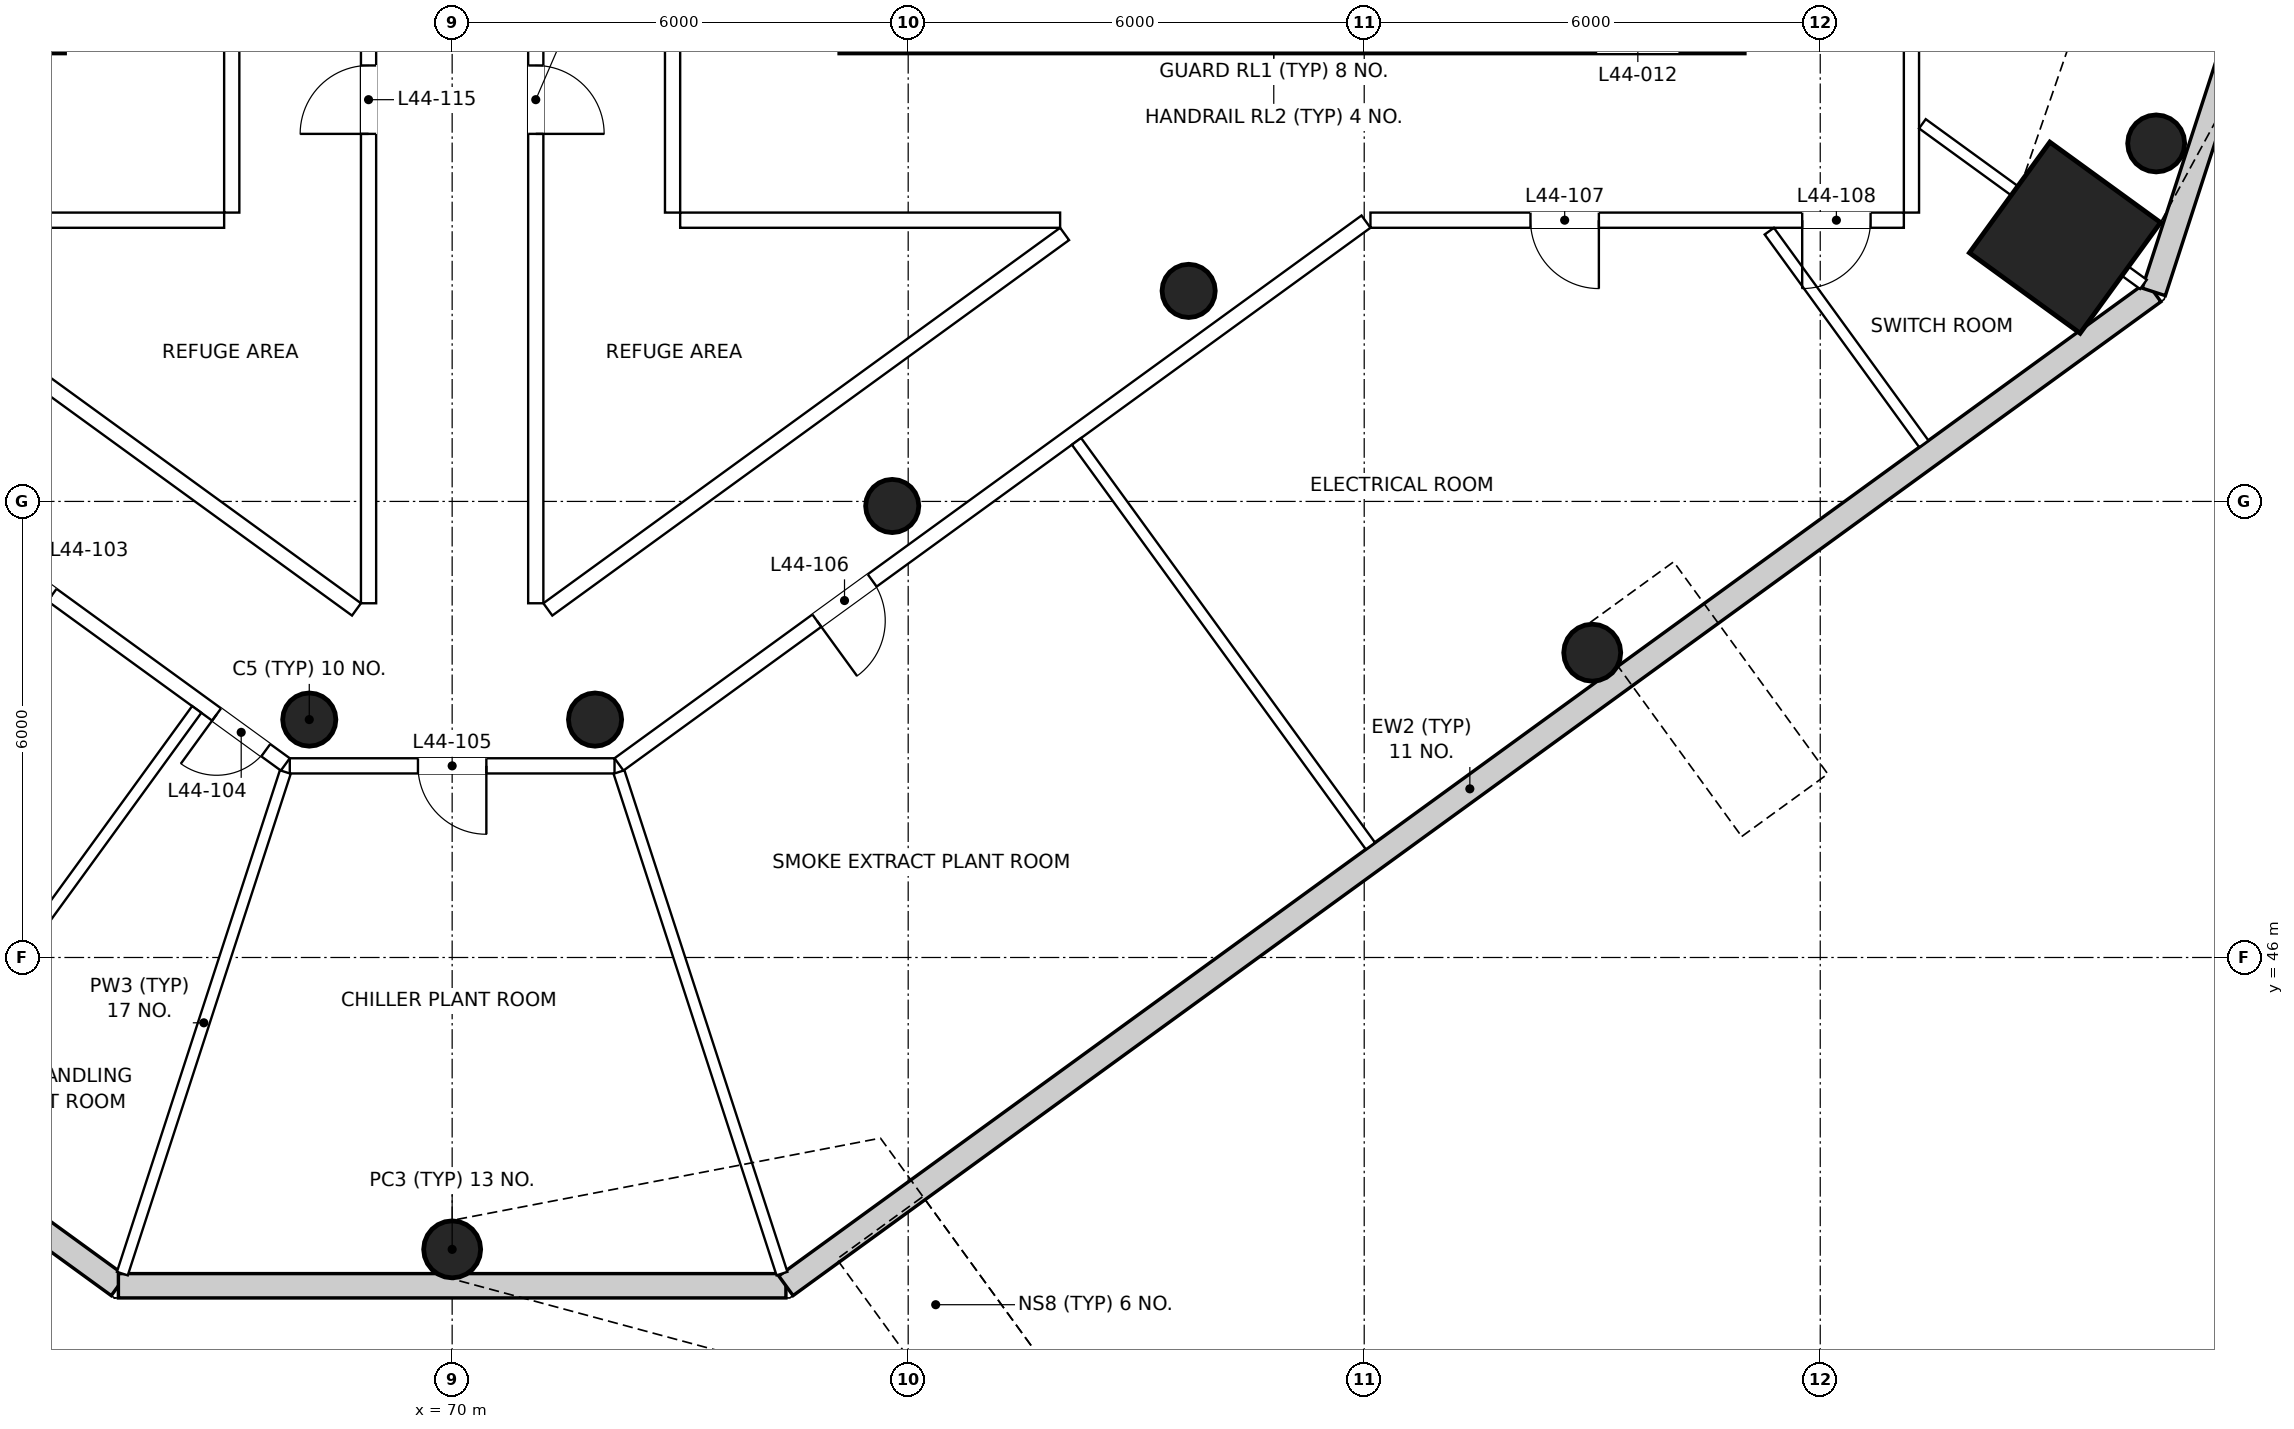
"""IFC4 building model, lengths in metres.
Left out: names, types, materials, properties, quantities, classifications, styles, units other than length and angle.
Written with IfcOpenShell. Run it as: python <this file> out.ifc"""

import sys

from ifc_helpers import new_model, si_unit, direction, frame, frame_2d, origin, origin_2d, place, context, subcontext, project, spatial, rectangle, circle, extrude, element, fill, save


model = new_model("IFC4")
c1 = context("Model", 3, precision=1e-05, world=origin(), true_north=direction((0.0, 1.0)))
c2 = subcontext(c1, "Body", "Model", "MODEL_VIEW")
j1 = project(units=[si_unit("LENGTHUNIT", "METRE"), si_unit("PLANEANGLEUNIT", "RADIAN")], contexts=[c1])
p1 = place(None, origin())
s1 = spatial("IfcSite", under=j1, at=p1, CompositionType="ELEMENT")
p2 = place(p1, origin())
s2 = spatial("IfcBuilding", under=s1, at=p2, CompositionType="ELEMENT")
p3 = place(p2, frame((0.0, 0.0, 191.5)))
s3 = spatial("IfcBuildingStorey", under=s2, at=p3, CompositionType="ELEMENT", Elevation=191.5)
for number, where, z_axis, x_axis in (
    (1, (70.0, 42.16, 0.0), (0.0, 0.0, 1.0), (1.0, 0.0, 0.0)),
    (2, (85.0, 50.01, 0.0), (0.0, 0.0, 1.0), (1.0, 0.0, 0.0)),
):
    element("IfcColumn", number, at=place(p3, frame(where, z_axis=z_axis, x_axis=x_axis)), inside=s3, PredefinedType="COLUMN", context=c2, shape_type="SweptSolid", body=[
        extrude(circle(Radius=0.375, at=origin_2d()), origin(), (0.0, 0.0, 1.0), 5.0),
    ])
p4 = place(p3, frame((91.22, 55.47, 0.0), z_axis=(0.0, 0.0, 1.0), x_axis=(0.809016994375, -0.587785252292, 0.0)))
e3 = element("IfcColumn", 3, at=p4, inside=s3, PredefinedType="COLUMN", context=c2, shape_type="SweptSolid", body=[
    extrude(rectangle(XDim=1.8, YDim=1.8, at=origin_2d()), origin(), (0.0, 0.0, 1.0), 5.0),
])
p5 = place(p3, frame((92.42, 56.71, 0.0), z_axis=(0.0, 0.0, 1.0), x_axis=(1.0, 0.0, 0.0)))
e4 = element("IfcColumn", 4, at=p5, inside=s3, PredefinedType="COLUMN", context=c2, shape_type="SweptSolid", body=[
    extrude(circle(Radius=0.375, at=origin_2d()), origin(), (0.0, 0.0, 1.0), 5.0),
])
for number, where, z_axis, x_axis in (
    (5, (68.12, 49.13, 0.0), (0.0, 0.0, 1.0), (1.0, 0.0, 0.0)),
    (6, (71.88, 49.13, 0.0), (0.0, 0.0, 1.0), (1.0, 0.0, 0.0)),
    (7, (75.79, 51.94, 0.0), (0.0, 0.0, 1.0), (1.0, 0.0, 0.0)),
    (8, (79.69, 54.77, 0.0), (0.0, 0.0, 1.0), (1.0, 0.0, 0.0)),
):
    element("IfcColumn", number, at=place(p3, frame(where, z_axis=z_axis, x_axis=x_axis)), inside=s3, PredefinedType="COLUMN", context=c2, shape_type="SweptSolid", body=[
        extrude(circle(Radius=0.35, at=origin_2d()), origin(), (0.0, 0.0, 1.0), 5.0),
    ])
p6 = place(p3, frame((47.612, 54.757, 0.0), z_axis=(0.0, 0.0, 1.0), x_axis=(0.809015997552, -0.5877866243, 0.0)))
e9 = element("IfcWall", 9, at=p6, inside=s3, PredefinedType="SOLIDWALL", context=c2, shape_type="SweptSolid", body=[
    extrude(rectangle(XDim=22.246, YDim=0.32, at=frame_2d((11.123, 0.0))), origin(), (0.0, 0.0, 1.0), 4.7),
])
p7 = place(p3, frame((65.609, 41.681, 0.0), z_axis=(0.0, 0.0, 1.0), x_axis=(1.0, 0.0, 0.0)))
e10 = element("IfcWall", 10, at=p7, inside=s3, PredefinedType="SOLIDWALL", context=c2, shape_type="SweptSolid", body=[
    extrude(rectangle(XDim=8.783, YDim=0.32, at=frame_2d((4.391, 0.0))), origin(), (0.0, 0.0, 1.0), 4.7),
])
p8 = place(p3, frame((74.391, 41.681, 0.0), z_axis=(0.0, 0.0, 1.0), x_axis=(0.809015997552, 0.5877866243, 0.0)))
e11 = element("IfcWall", 11, at=p8, inside=s3, PredefinedType="SOLIDWALL", context=c2, shape_type="SweptSolid", body=[
    extrude(rectangle(XDim=22.246, YDim=0.32, at=frame_2d((11.123, 0.0))), origin(), (0.0, 0.0, 1.0), 4.7),
])
p9 = place(p3, frame((92.388, 54.757, 0.0), z_axis=(0.0, 0.0, 1.0), x_axis=(0.30901958848, 0.951055673415, 0.0)))
e12 = element("IfcWall", 12, at=p9, inside=s3, PredefinedType="SOLIDWALL", context=c2, shape_type="SweptSolid", body=[
    extrude(rectangle(XDim=8.22, YDim=0.32, at=frame_2d((4.11, 0.0))), origin(), (0.0, 0.0, 1.0), 4.7),
])
p10 = place(p3, frame((53.0, 58.05, 0.0), z_axis=(0.0, 0.0, 1.0), x_axis=(1.0, 0.0, 0.0)))
e13 = element("IfcWall", 13, at=p10, inside=s3, PredefinedType="SHEAR", context=c2, shape_type="SweptSolid", body=[
    extrude(rectangle(XDim=11.9, YDim=0.3, at=frame_2d((5.95, 0.0))), origin(), (0.0, 0.0, 1.0), 5.0),
])
p11 = place(p10, frame((0.85, 0.0, 0.0)))
e14 = element("IfcOpeningElement", 14, at=p11, cuts=e13, PredefinedType="OPENING", context=c2, shape_type="SweptSolid", body=[
    extrude(rectangle(XDim=1.1, YDim=2.1, at=frame_2d((0.55, 1.05))), frame((0.0, 0.16, 0.0), z_axis=(0.0, -1.0, 0.0), x_axis=(1.0, 0.0, 0.0)), (0.0, 0.0, 1.0), 0.32),
])
p12 = place(p3, frame((75.1, 58.05, 0.0), z_axis=(0.0, 0.0, 1.0), x_axis=(1.0, 0.0, 0.0)))
e15 = element("IfcWall", 15, at=p12, inside=s3, PredefinedType="SHEAR", context=c2, shape_type="SweptSolid", body=[
    extrude(rectangle(XDim=11.9, YDim=0.3, at=frame_2d((5.95, 0.0))), origin(), (0.0, 0.0, 1.0), 5.0),
])
p13 = place(p12, frame((9.95, 0.0, 0.0)))
e16 = element("IfcOpeningElement", 16, at=p13, cuts=e15, PredefinedType="OPENING", context=c2, shape_type="SweptSolid", body=[
    extrude(rectangle(XDim=1.1, YDim=2.1, at=frame_2d((0.55, 1.05))), frame((0.0, 0.16, 0.0), z_axis=(0.0, -1.0, 0.0), x_axis=(1.0, 0.0, 0.0)), (0.0, 0.0, 1.0), 0.32),
])
p14 = place(p3, frame((89.2, 64.15, 0.0), z_axis=(0.0, 0.0, 1.0), x_axis=(0.0, -1.0, 0.0)))
e17 = element("IfcWall", 17, at=p14, inside=s3, PredefinedType="PARTITIONING", context=c2, shape_type="SweptSolid", body=[
    extrude(rectangle(XDim=8.35, YDim=0.2, at=frame_2d((4.175, 0.0))), origin(), (0.0, 0.0, 1.0), 4.0),
])
p15 = place(p14, frame((3.876, 0.0, 0.0)))
e18 = element("IfcOpeningElement", 18, at=p15, cuts=e17, PredefinedType="OPENING", context=c2, shape_type="SweptSolid", body=[
    extrude(rectangle(XDim=0.9, YDim=2.1, at=frame_2d((0.45, 1.05))), frame((0.0, 0.11, 0.0), z_axis=(0.0, -1.0, 0.0), x_axis=(1.0, 0.0, 0.0)), (0.0, 0.0, 1.0), 0.22),
])
p16 = place(p3, frame((89.1, 55.7, 0.0), z_axis=(0.0, 0.0, 1.0), x_axis=(-1.0, 0.0, 0.0)))
e19 = element("IfcWall", 19, at=p16, inside=s3, PredefinedType="PARTITIONING", context=c2, shape_type="SweptSolid", body=[
    extrude(rectangle(XDim=7.018, YDim=0.2, at=frame_2d((3.509, 0.0))), origin(), (0.0, 0.0, 1.0), 4.0),
])
p17 = place(p16, frame((4.013, 0.0, 0.0)))
e20 = element("IfcOpeningElement", 20, at=p17, cuts=e19, PredefinedType="OPENING", context=c2, shape_type="SweptSolid", body=[
    extrude(rectangle(XDim=0.9, YDim=2.1, at=frame_2d((0.45, 1.05))), frame((0.0, 0.11, 0.0), z_axis=(0.0, -1.0, 0.0), x_axis=(1.0, 0.0, 0.0)), (0.0, 0.0, 1.0), 0.22),
])
p18 = place(p16, frame((0.438, 0.0, 0.0)))
e21 = element("IfcOpeningElement", 21, at=p18, cuts=e19, PredefinedType="OPENING", context=c2, shape_type="SweptSolid", body=[
    extrude(rectangle(XDim=0.9, YDim=2.1, at=frame_2d((0.45, 1.05))), frame((0.0, 0.11, 0.0), z_axis=(0.0, -1.0, 0.0), x_axis=(1.0, 0.0, 0.0)), (0.0, 0.0, 1.0), 0.22),
])
p19 = place(p3, frame((82.023, 55.681, 0.0), z_axis=(0.0, 0.0, 1.0), x_axis=(-0.809021032416, -0.587779694366, 0.0)))
e22 = element("IfcWall", 22, at=p19, inside=s3, PredefinedType="PARTITIONING", context=c2, shape_type="SweptSolid", body=[
    extrude(rectangle(XDim=12.148, YDim=0.2, at=frame_2d((6.074, 0.0))), origin(), (0.0, 0.0, 1.0), 3.7),
])
p20 = place(p19, frame((8.031, 0.0, 0.0)))
e23 = element("IfcOpeningElement", 23, at=p20, cuts=e22, PredefinedType="OPENING", context=c2, shape_type="SweptSolid", body=[
    extrude(rectangle(XDim=0.9, YDim=2.1, at=frame_2d((0.45, 1.05))), frame((0.0, 0.11, 0.0), z_axis=(0.0, -1.0, 0.0), x_axis=(1.0, 0.0, 0.0)), (0.0, 0.0, 1.0), 0.22),
])
p21 = place(p3, frame((72.136, 48.521, 0.0), z_axis=(0.0, 0.0, 1.0), x_axis=(-1.0, 0.0, 0.0)))
e24 = element("IfcWall", 24, at=p21, inside=s3, PredefinedType="PARTITIONING", context=c2, shape_type="SweptSolid", body=[
    extrude(rectangle(XDim=4.272, YDim=0.2, at=frame_2d((2.136, 0.0))), origin(), (0.0, 0.0, 1.0), 3.7),
])
p22 = place(p21, frame((1.686, 0.0, 0.0)))
e25 = element("IfcOpeningElement", 25, at=p22, cuts=e24, PredefinedType="OPENING", context=c2, shape_type="SweptSolid", body=[
    extrude(rectangle(XDim=0.9, YDim=2.1, at=frame_2d((0.45, 1.05))), frame((0.0, 0.11, 0.0), z_axis=(0.0, -1.0, 0.0), x_axis=(1.0, 0.0, 0.0)), (0.0, 0.0, 1.0), 0.22),
])
p23 = place(p3, frame((67.805, 48.54, 0.0), z_axis=(0.0, 0.0, 1.0), x_axis=(-0.809021032416, 0.587779694366, 0.0)))
e26 = element("IfcWall", 26, at=p23, inside=s3, PredefinedType="PARTITIONING", context=c2, shape_type="SweptSolid", body=[
    extrude(rectangle(XDim=12.148, YDim=0.2, at=frame_2d((6.074, 0.0))), origin(), (0.0, 0.0, 1.0), 3.7),
])
p24 = place(p23, frame((3.793, 0.0, 0.0)))
e27 = element("IfcOpeningElement", 27, at=p24, cuts=e26, PredefinedType="OPENING", context=c2, shape_type="SweptSolid", body=[
    extrude(rectangle(XDim=0.9, YDim=2.1, at=frame_2d((0.45, 1.05))), frame((0.0, 0.11, 0.0), z_axis=(0.0, -1.0, 0.0), x_axis=(1.0, 0.0, 0.0)), (0.0, 0.0, 1.0), 0.22),
])
p25 = place(p23, frame((0.318, 0.0, 0.0)))
e28 = element("IfcOpeningElement", 28, at=p25, cuts=e26, PredefinedType="OPENING", context=c2, shape_type="SweptSolid", body=[
    extrude(rectangle(XDim=0.8, YDim=2.1, at=frame_2d((0.4, 1.05))), frame((0.0, 0.11, 0.0), z_axis=(0.0, -1.0, 0.0), x_axis=(1.0, 0.0, 0.0)), (0.0, 0.0, 1.0), 0.22),
])
p26 = place(p3, frame((71.1, 63.85, 0.0), z_axis=(0.0, 0.0, 1.0), x_axis=(0.0, -1.0, 0.0)))
e29 = element("IfcWall", 29, at=p26, inside=s3, PredefinedType="PARTITIONING", context=c2, shape_type="SweptSolid", body=[
    extrude(rectangle(XDim=13.19, YDim=0.2, at=frame_2d((6.595, 0.0))), origin(), (0.0, 0.0, 1.0), 3.7),
])
p27 = place(p26, frame((6.115, 0.0, 0.0)))
e30 = element("IfcOpeningElement", 30, at=p27, cuts=e29, PredefinedType="OPENING", context=c2, shape_type="SweptSolid", body=[
    extrude(rectangle(XDim=0.9, YDim=2.1, at=frame_2d((0.45, 1.05))), frame((0.0, 0.11, 0.0), z_axis=(0.0, -1.0, 0.0), x_axis=(1.0, 0.0, 0.0)), (0.0, 0.0, 1.0), 0.22),
])
p28 = place(p3, frame((71.259, 50.579, 0.0), z_axis=(0.0, 0.0, 1.0), x_axis=(0.809023664715, 0.587776071248, 0.0)))
e31 = element("IfcWall", 31, at=p28, inside=s3, PredefinedType="PARTITIONING", context=c2, shape_type="SweptSolid", body=[
    extrude(rectangle(XDim=8.404, YDim=0.2, at=frame_2d((4.202, 0.0))), origin(), (0.0, 0.0, 1.0), 3.7),
])
p29 = place(p3, frame((77.999, 55.7, 0.0), z_axis=(0.0, 0.0, 1.0), x_axis=(-1.0, 0.0, 0.0)))
e32 = element("IfcWall", 32, at=p29, inside=s3, PredefinedType="PARTITIONING", context=c2, shape_type="SweptSolid", body=[
    extrude(rectangle(XDim=4.999, YDim=0.2, at=frame_2d((2.5, 0.0))), origin(), (0.0, 0.0, 1.0), 3.7),
])
p30 = place(p3, frame((72.9, 55.8, 0.0), z_axis=(0.0, 0.0, 1.0), x_axis=(0.0, 1.0, 0.0)))
e33 = element("IfcWall", 33, at=p30, inside=s3, PredefinedType="PARTITIONING", context=c2, shape_type="SweptSolid", body=[
    extrude(rectangle(XDim=8.35, YDim=0.2, at=frame_2d((4.175, 0.0))), origin(), (0.0, 0.0, 1.0), 3.7),
])
p31 = place(p3, frame((68.9, 50.66, 0.0), z_axis=(0.0, 0.0, 1.0), x_axis=(0.0, 1.0, 0.0)))
e34 = element("IfcWall", 34, at=p31, inside=s3, PredefinedType="PARTITIONING", context=c2, shape_type="SweptSolid", body=[
    extrude(rectangle(XDim=13.19, YDim=0.2, at=frame_2d((6.595, 0.0))), origin(), (0.0, 0.0, 1.0), 3.7),
])
p32 = place(p31, frame((6.175, 0.0, 0.0)))
e35 = element("IfcOpeningElement", 35, at=p32, cuts=e34, PredefinedType="OPENING", context=c2, shape_type="SweptSolid", body=[
    extrude(rectangle(XDim=0.9, YDim=2.1, at=frame_2d((0.45, 1.05))), frame((0.0, 0.11, 0.0), z_axis=(0.0, -1.0, 0.0), x_axis=(1.0, 0.0, 0.0)), (0.0, 0.0, 1.0), 0.22),
])
p33 = place(p3, frame((67.1, 64.15, 0.0), z_axis=(0.0, 0.0, 1.0), x_axis=(0.0, -1.0, 0.0)))
e36 = element("IfcWall", 36, at=p33, inside=s3, PredefinedType="PARTITIONING", context=c2, shape_type="SweptSolid", body=[
    extrude(rectangle(XDim=8.35, YDim=0.2, at=frame_2d((4.175, 0.0))), origin(), (0.0, 0.0, 1.0), 3.7),
])
p34 = place(p3, frame((67.0, 55.7, 0.0), z_axis=(0.0, 0.0, 1.0), x_axis=(-1.0, 0.0, 0.0)))
e37 = element("IfcWall", 37, at=p34, inside=s3, PredefinedType="PARTITIONING", context=c2, shape_type="SweptSolid", body=[
    extrude(rectangle(XDim=4.999, YDim=0.2, at=frame_2d((2.5, 0.0))), origin(), (0.0, 0.0, 1.0), 3.7),
])
p35 = place(p3, frame((61.942, 55.519, 0.0), z_axis=(0.0, 0.0, 1.0), x_axis=(0.809023664715, -0.587776071248, 0.0)))
e38 = element("IfcWall", 38, at=p35, inside=s3, PredefinedType="PARTITIONING", context=c2, shape_type="SweptSolid", body=[
    extrude(rectangle(XDim=8.404, YDim=0.2, at=frame_2d((4.202, 0.0))), origin(), (0.0, 0.0, 1.0), 3.7),
])
for number, where, z_axis, x_axis in (
    (39, (65.661, 41.841, 0.0), (0.0, 0.0, 1.0), (0.309, 0.951, 0.0)),
    (40, (74.339, 41.841, 0.0), (0.0, 0.0, 1.0), (-0.309, 0.951, 0.0)),
):
    element("IfcWall", number, at=place(p3, frame(where, z_axis=z_axis, x_axis=x_axis)), inside=s3, PredefinedType="PARTITIONING", context=c2, shape_type="SweptSolid", body=[
        extrude(rectangle(XDim=6.939, YDim=0.15, at=frame_2d((3.469, 0.0))), origin(), (0.0, 0.0, 1.0), 4.7),
    ])
p36 = place(p3, frame((92.252, 54.856, 0.0), z_axis=(0.0, 0.0, 1.0), x_axis=(-0.809035551496, 0.587759709759, 0.0)))
e41 = element("IfcWall", 41, at=p36, inside=s3, PredefinedType="PARTITIONING", context=c2, shape_type="SweptSolid", body=[
    extrude(rectangle(XDim=3.595, YDim=0.15, at=frame_2d((1.797, 0.0))), origin(), (0.0, 0.0, 1.0), 3.7),
])
p37 = place(p3, frame((62.772, 43.94, 0.0), z_axis=(0.0, 0.0, 1.0), x_axis=(0.587772301387, 0.8090264036, 0.0)))
e42 = element("IfcWall", 42, at=p37, inside=s3, PredefinedType="PARTITIONING", context=c2, shape_type="SweptSolid", body=[
    extrude(rectangle(XDim=6.58, YDim=0.15, at=frame_2d((3.29, 0.0))), origin(), (0.0, 0.0, 1.0), 4.7),
])
p38 = place(p3, frame((82.082, 47.467, 0.0), z_axis=(0.0, 0.0, 1.0), x_axis=(-0.587796586364, 0.809008759569, 0.0)))
e43 = element("IfcWall", 43, at=p38, inside=s3, PredefinedType="PARTITIONING", context=c2, shape_type="SweptSolid", body=[
    extrude(rectangle(XDim=6.58, YDim=0.15, at=frame_2d((3.29, 0.0))), origin(), (0.0, 0.0, 1.0), 4.7),
])
p39 = place(p3, frame((89.363, 52.757, 0.0), z_axis=(0.0, 0.0, 1.0), x_axis=(-0.587760469668, 0.809034999426, 0.0)))
e44 = element("IfcWall", 44, at=p39, inside=s3, PredefinedType="PARTITIONING", context=c2, shape_type="SweptSolid", body=[
    extrude(rectangle(XDim=3.46, YDim=0.15, at=frame_2d((1.73, 0.0))), origin(), (0.0, 0.0, 1.0), 4.0),
])
p40 = place(p24, origin())
e45 = element("IfcDoor", 45, at=p40, inside=s3, OperationType="SINGLE_SWING_LEFT", PredefinedType="DOOR", context=c2, shape_type="SweptSolid", body=[
    extrude(rectangle(XDim=0.9, YDim=2.1, at=frame_2d((0.45, 1.05))), frame((0.0, 0.025, 0.0), z_axis=(0.0, -1.0, 0.0), x_axis=(1.0, 0.0, 0.0)), (0.0, 0.0, 1.0), 0.05),
])
fill(e27, e45)
p41 = place(p25, origin())
e46 = element("IfcDoor", 46, at=p41, inside=s3, OperationType="SINGLE_SWING_RIGHT", PredefinedType="DOOR", context=c2, shape_type="SweptSolid", body=[
    extrude(rectangle(XDim=0.8, YDim=2.1, at=frame_2d((0.4, 1.05))), frame((0.0, 0.025, 0.0), z_axis=(0.0, -1.0, 0.0), x_axis=(1.0, 0.0, 0.0)), (0.0, 0.0, 1.0), 0.05),
])
fill(e28, e46)
p42 = place(p22, origin())
e47 = element("IfcDoor", 47, at=p42, inside=s3, OperationType="SINGLE_SWING_LEFT", PredefinedType="DOOR", context=c2, shape_type="SweptSolid", body=[
    extrude(rectangle(XDim=0.9, YDim=2.1, at=frame_2d((0.45, 1.05))), frame((0.0, 0.025, 0.0), z_axis=(0.0, -1.0, 0.0), x_axis=(1.0, 0.0, 0.0)), (0.0, 0.0, 1.0), 0.05),
])
fill(e25, e47)
p43 = place(p20, origin())
e48 = element("IfcDoor", 48, at=p43, inside=s3, OperationType="SINGLE_SWING_RIGHT", PredefinedType="DOOR", context=c2, shape_type="SweptSolid", body=[
    extrude(rectangle(XDim=0.9, YDim=2.1, at=frame_2d((0.45, 1.05))), frame((0.0, 0.025, 0.0), z_axis=(0.0, -1.0, 0.0), x_axis=(1.0, 0.0, 0.0)), (0.0, 0.0, 1.0), 0.05),
])
fill(e23, e48)
p44 = place(p17, origin())
e49 = element("IfcDoor", 49, at=p44, inside=s3, OperationType="SINGLE_SWING_LEFT", PredefinedType="DOOR", context=c2, shape_type="SweptSolid", body=[
    extrude(rectangle(XDim=0.9, YDim=2.1, at=frame_2d((0.45, 1.05))), frame((0.0, 0.025, 0.0), z_axis=(0.0, -1.0, 0.0), x_axis=(1.0, 0.0, 0.0)), (0.0, 0.0, 1.0), 0.05),
])
fill(e20, e49)
p45 = place(p18, origin())
e50 = element("IfcDoor", 50, at=p45, inside=s3, OperationType="SINGLE_SWING_RIGHT", PredefinedType="DOOR", context=c2, shape_type="SweptSolid", body=[
    extrude(rectangle(XDim=0.9, YDim=2.1, at=frame_2d((0.45, 1.05))), frame((0.0, 0.025, 0.0), z_axis=(0.0, -1.0, 0.0), x_axis=(1.0, 0.0, 0.0)), (0.0, 0.0, 1.0), 0.05),
])
fill(e21, e50)
p46 = place(p32, origin())
e51 = element("IfcDoor", 51, at=p46, inside=s3, OperationType="SINGLE_SWING_LEFT", PredefinedType="DOOR", context=c2, shape_type="SweptSolid", body=[
    extrude(rectangle(XDim=0.9, YDim=2.1, at=frame_2d((0.45, 1.05))), frame((0.0, 0.025, 0.0), z_axis=(0.0, -1.0, 0.0), x_axis=(1.0, 0.0, 0.0)), (0.0, 0.0, 1.0), 0.05),
])
fill(e35, e51)
p47 = place(p27, origin())
e52 = element("IfcDoor", 52, at=p47, inside=s3, OperationType="SINGLE_SWING_RIGHT", PredefinedType="DOOR", context=c2, shape_type="SweptSolid", body=[
    extrude(rectangle(XDim=0.9, YDim=2.1, at=frame_2d((0.45, 1.05))), frame((0.0, 0.025, 0.0), z_axis=(0.0, -1.0, 0.0), x_axis=(1.0, 0.0, 0.0)), (0.0, 0.0, 1.0), 0.05),
])
fill(e30, e52)
save(model, sys.argv[1])
